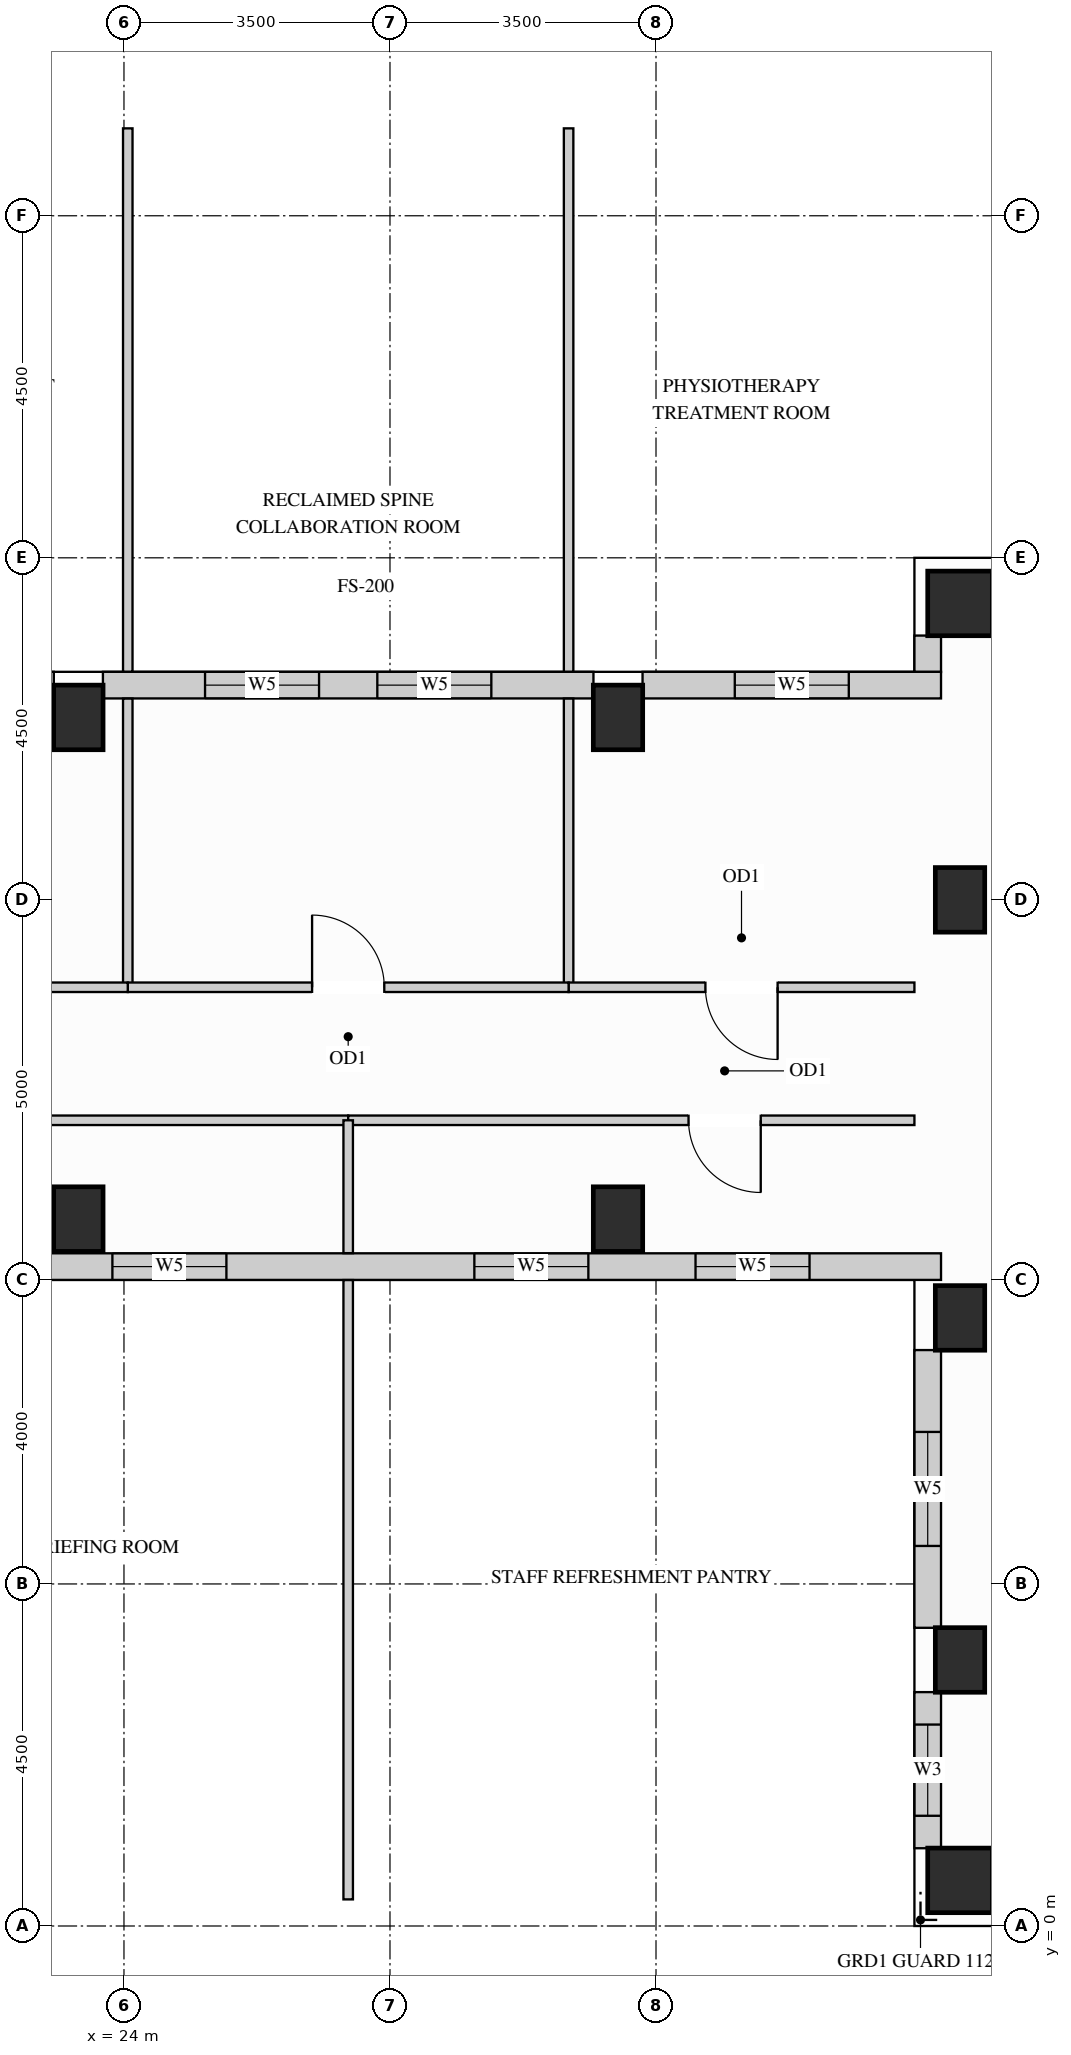
"""IFC4 building model, lengths in metres.
Left out: names, types, materials, properties, quantities, classifications, styles, units other than length and angle.
Written with IfcOpenShell. Run it as: python <this file> out.ifc"""

import sys

from ifc_helpers import new_model, si_unit, direction, frame, frame_2d, origin, origin_2d, place, context, subcontext, project, spatial, rectangle, extrude, source, transform, mapped, element, fill, save


model = new_model("IFC4")
c1 = context("Model", 3, precision=1e-05, world=origin(), true_north=direction((0.0, 1.0)))
c2 = subcontext(c1, "Body", "Model", "MODEL_VIEW")
j1 = project(units=[si_unit("LENGTHUNIT", "METRE"), si_unit("PLANEANGLEUNIT", "RADIAN")], contexts=[c1])
p1 = place(None, origin())
s1 = spatial("IfcSite", under=j1, at=p1, CompositionType="ELEMENT")
p2 = place(p1, origin())
s2 = spatial("IfcBuilding", under=s1, at=p2, CompositionType="ELEMENT")
p3 = place(p2, frame((0.0, 0.0, 226.8)))
s3 = spatial("IfcBuildingStorey", under=s2, at=p3, CompositionType="ELEMENT", Elevation=226.8)
m1 = source(origin(), c2, "Body", "SweptSolid", [
    extrude(rectangle(XDim=0.65, YDim=0.85, at=origin_2d()), origin(), (0.0, 0.0, 1.0), 3.4),
])
for number, where, z_axis, x_axis in (
    (1, (35.0, 13.5, 0.0), (0.0, 0.0, 1.0), (1.0, 0.0, 0.0)),
    (2, (35.0, 3.5, 0.0), (0.0, 0.0, 1.0), (1.0, 0.0, 0.0)),
    (3, (35.0, 8.0, 0.0), (0.0, 0.0, 1.0), (1.0, 0.0, 0.0)),
    (4, (23.4, 15.9, 0.0), (0.0, 0.0, 1.0), (1.0, 0.0, 0.0)),
    (5, (23.4, 9.3, 0.0), (0.0, 0.0, 1.0), (1.0, 0.0, 0.0)),
    (6, (30.5, 15.9, 0.0), (0.0, 0.0, 1.0), (1.0, 0.0, 0.0)),
    (7, (30.5, 9.3, 0.0), (0.0, 0.0, 1.0), (1.0, 0.0, 0.0)),
):
    element("IfcColumn", number, at=place(p3, frame(where, z_axis=z_axis, x_axis=x_axis)), inside=s3, PredefinedType="COLUMN", context=c2, shape_type="MappedRepresentation", body=[
        mapped(m1, transform((0.0, 0.0, 0.0), x_axis=(1.0, 0.0, 0.0), y_axis=(0.0, 1.0, 0.0), z_axis=(0.0, 0.0, 1.0))),
    ])
m2 = source(origin(), c2, "Body", "SweptSolid", [
    extrude(rectangle(XDim=0.85, YDim=0.85, at=origin_2d()), origin(), (0.0, 0.0, 1.0), 3.4),
])
for number, where, z_axis, x_axis in (
    (8, (35.0, 17.4, 0.0), (0.0, 0.0, 1.0), (1.0, 0.0, 0.0)),
    (9, (35.0, 0.6, 0.0), (0.0, 0.0, 1.0), (1.0, 0.0, 0.0)),
):
    element("IfcColumn", number, at=place(p3, frame(where, z_axis=z_axis, x_axis=x_axis)), inside=s3, PredefinedType="COLUMN", context=c2, shape_type="MappedRepresentation", body=[
        mapped(m2, transform((0.0, 0.0, 0.0), x_axis=(1.0, 0.0, 0.0), y_axis=(0.0, 1.0, 0.0), z_axis=(0.0, 0.0, 1.0))),
    ])
p4 = place(p3, frame((19.323, 8.675, 0.0), z_axis=(0.0, 0.0, 1.0), x_axis=(1.0, 0.0, 0.0)))
e10 = element("IfcWall", 10, at=p4, inside=s3, PredefinedType="SOLIDWALL", context=c2, shape_type="SweptSolid", body=[
    extrude(rectangle(XDim=15.427, YDim=0.35, at=frame_2d((7.713, 0.0))), origin(), (0.0, 0.0, 1.0), 3.385),
])
p5 = place(p4, frame((1.672, 0.0, 0.78)))
e11 = element("IfcOpeningElement", 11, at=p5, cuts=e10, PredefinedType="OPENING", context=c2, shape_type="SweptSolid", body=[
    extrude(rectangle(XDim=1.5, YDim=2.0, at=frame_2d((0.75, 1.0))), frame((0.0, 0.185, 0.0), z_axis=(0.0, -1.0, 0.0), x_axis=(1.0, 0.0, 0.0)), (0.0, 0.0, 1.0), 0.37),
])
p6 = place(p4, frame((4.525, 0.0, 0.78)))
e12 = element("IfcOpeningElement", 12, at=p6, cuts=e10, PredefinedType="OPENING", context=c2, shape_type="SweptSolid", body=[
    extrude(rectangle(XDim=1.5, YDim=2.0, at=frame_2d((0.75, 1.0))), frame((0.0, 0.185, 0.0), z_axis=(0.0, -1.0, 0.0), x_axis=(1.0, 0.0, 0.0)), (0.0, 0.0, 1.0), 0.37),
])
p7 = place(p4, frame((9.287, 0.0, 0.78)))
e13 = element("IfcOpeningElement", 13, at=p7, cuts=e10, PredefinedType="OPENING", context=c2, shape_type="SweptSolid", body=[
    extrude(rectangle(XDim=1.5, YDim=2.0, at=frame_2d((0.75, 1.0))), frame((0.0, 0.185, 0.0), z_axis=(0.0, -1.0, 0.0), x_axis=(1.0, 0.0, 0.0)), (0.0, 0.0, 1.0), 0.37),
])
p8 = place(p4, frame((12.197, 0.0, 0.78)))
e14 = element("IfcOpeningElement", 14, at=p8, cuts=e10, PredefinedType="OPENING", context=c2, shape_type="SweptSolid", body=[
    extrude(rectangle(XDim=1.5, YDim=2.0, at=frame_2d((0.75, 1.0))), frame((0.0, 0.185, 0.0), z_axis=(0.0, -1.0, 0.0), x_axis=(1.0, 0.0, 0.0)), (0.0, 0.0, 1.0), 0.37),
])
p9 = place(p3, frame((34.575, 7.577, 0.0), z_axis=(0.0, 0.0, 1.0), x_axis=(0.0, -1.0, 0.0)))
e15 = element("IfcWall", 15, at=p9, inside=s3, PredefinedType="SOLIDWALL", context=c2, shape_type="SweptSolid", body=[
    extrude(rectangle(XDim=3.654, YDim=0.35, at=frame_2d((1.827, 0.0))), origin(), (0.0, 0.0, 1.0), 3.385),
])
p10 = place(p9, frame((1.077, 0.0, 0.78)))
e16 = element("IfcOpeningElement", 16, at=p10, cuts=e15, PredefinedType="OPENING", context=c2, shape_type="SweptSolid", body=[
    extrude(rectangle(XDim=1.5, YDim=2.0, at=frame_2d((0.75, 1.0))), frame((0.0, 0.185, 0.0), z_axis=(0.0, -1.0, 0.0), x_axis=(1.0, 0.0, 0.0)), (0.0, 0.0, 1.0), 0.37),
])
p11 = place(p3, frame((34.575, 3.077, 0.0), z_axis=(0.0, 0.0, 1.0), x_axis=(0.0, -1.0, 0.0)))
e17 = element("IfcWall", 17, at=p11, inside=s3, PredefinedType="SOLIDWALL", context=c2, shape_type="SweptSolid", body=[
    extrude(rectangle(XDim=2.054, YDim=0.35, at=frame_2d((1.027, 0.0))), origin(), (0.0, 0.0, 1.0), 3.385),
])
p12 = place(p11, frame((0.427, 0.0, 0.78)))
e18 = element("IfcOpeningElement", 18, at=p12, cuts=e17, PredefinedType="OPENING", context=c2, shape_type="SweptSolid", body=[
    extrude(rectangle(XDim=1.2, YDim=2.0, at=frame_2d((0.6, 1.0))), frame((0.0, 0.185, 0.0), z_axis=(0.0, -1.0, 0.0), x_axis=(1.0, 0.0, 0.0)), (0.0, 0.0, 1.0), 0.37),
])
m3 = source(origin(), c2, "Body", "SweptSolid", [
    extrude(rectangle(XDim=0.479, YDim=0.35, at=frame_2d((0.24, 0.0))), origin(), (0.0, 0.0, 1.0), 3.385),
])
p13 = place(p3, frame((34.575, 16.977, 0.0), z_axis=(0.0, 0.0, 1.0), x_axis=(0.0, -1.0, 0.0)))
e19 = element("IfcWall", 19, at=p13, inside=s3, PredefinedType="SOLIDWALL", context=c2, shape_type="MappedRepresentation", body=[
    mapped(m3, transform((0.0, 0.0, 0.0), x_axis=(1.0, 0.0, 0.0), y_axis=(0.0, 1.0, 0.0), z_axis=(0.0, 0.0, 1.0))),
])
p14 = place(p3, frame((34.75, 16.325, 0.0), z_axis=(0.0, 0.0, 1.0), x_axis=(-1.0, 0.0, 0.0)))
e20 = element("IfcWall", 20, at=p14, inside=s3, PredefinedType="SOLIDWALL", context=c2, shape_type="SweptSolid", body=[
    extrude(rectangle(XDim=3.927, YDim=0.35, at=frame_2d((1.963, 0.0))), origin(), (0.0, 0.0, 1.0), 3.385),
])
p15 = place(p14, frame((1.213, 0.0, 0.78)))
e21 = element("IfcOpeningElement", 21, at=p15, cuts=e20, PredefinedType="OPENING", context=c2, shape_type="SweptSolid", body=[
    extrude(rectangle(XDim=1.5, YDim=2.0, at=frame_2d((0.75, 1.0))), frame((0.0, 0.185, 0.0), z_axis=(0.0, -1.0, 0.0), x_axis=(1.0, 0.0, 0.0)), (0.0, 0.0, 1.0), 0.37),
])
p16 = place(p3, frame((30.177, 16.325, 0.0), z_axis=(0.0, 0.0, 1.0), x_axis=(-1.0, 0.0, 0.0)))
e22 = element("IfcWall", 22, at=p16, inside=s3, PredefinedType="SOLIDWALL", context=c2, shape_type="SweptSolid", body=[
    extrude(rectangle(XDim=6.454, YDim=0.35, at=frame_2d((3.227, 0.0))), origin(), (0.0, 0.0, 1.0), 3.385),
])
p17 = place(p16, frame((1.344, 0.0, 0.78)))
e23 = element("IfcOpeningElement", 23, at=p17, cuts=e22, PredefinedType="OPENING", context=c2, shape_type="SweptSolid", body=[
    extrude(rectangle(XDim=1.5, YDim=2.0, at=frame_2d((0.75, 1.0))), frame((0.0, 0.185, 0.0), z_axis=(0.0, -1.0, 0.0), x_axis=(1.0, 0.0, 0.0)), (0.0, 0.0, 1.0), 0.37),
])
p18 = place(p16, frame((3.61, 0.0, 0.78)))
e24 = element("IfcOpeningElement", 24, at=p18, cuts=e22, PredefinedType="OPENING", context=c2, shape_type="SweptSolid", body=[
    extrude(rectangle(XDim=1.5, YDim=2.0, at=frame_2d((0.75, 1.0))), frame((0.0, 0.185, 0.0), z_axis=(0.0, -1.0, 0.0), x_axis=(1.0, 0.0, 0.0)), (0.0, 0.0, 1.0), 0.37),
])
p19 = place(p3, frame((23.077, 16.325, 0.0), z_axis=(0.0, 0.0, 1.0), x_axis=(-1.0, 0.0, 0.0)))
e25 = element("IfcWall", 25, at=p19, inside=s3, PredefinedType="SOLIDWALL", context=c2, shape_type="SweptSolid", body=[
    extrude(rectangle(XDim=3.927, YDim=0.35, at=frame_2d((1.963, 0.0))), origin(), (0.0, 0.0, 1.0), 3.385),
])
p20 = place(p19, frame((1.213, 0.0, 0.78)))
e26 = element("IfcOpeningElement", 26, at=p20, cuts=e25, PredefinedType="OPENING", context=c2, shape_type="SweptSolid", body=[
    extrude(rectangle(XDim=1.5, YDim=2.0, at=frame_2d((0.75, 1.0))), frame((0.0, 0.185, 0.0), z_axis=(0.0, -1.0, 0.0), x_axis=(1.0, 0.0, 0.0)), (0.0, 0.0, 1.0), 0.37),
])
m4 = source(origin(), c2, "Body", "SweptSolid", [
    extrude(rectangle(XDim=3.798, YDim=0.125, at=frame_2d((1.899, 0.0))), origin(), (0.0, 0.0, 1.0), 3.385),
])
p21 = place(p3, frame((24.05, 12.35, 0.0), z_axis=(0.0, 0.0, 1.0), x_axis=(0.0, 1.0, 0.0)))
e27 = element("IfcWall", 27, at=p21, inside=s3, PredefinedType="PARTITIONING", context=c2, shape_type="MappedRepresentation", body=[
    mapped(m4, transform((0.0, 0.0, 0.0), x_axis=(1.0, 0.0, 0.0), y_axis=(0.0, 1.0, 0.0), z_axis=(0.0, 0.0, 1.0))),
])
m5 = source(origin(), c2, "Body", "SweptSolid", [
    extrude(rectangle(XDim=7.148, YDim=0.125, at=frame_2d((3.574, 0.0))), origin(), (0.0, 0.0, 1.0), 3.385),
])
p22 = place(p3, frame((24.05, 16.502, 0.0), z_axis=(0.0, 0.0, 1.0), x_axis=(0.0, 1.0, 0.0)))
e28 = element("IfcWall", 28, at=p22, inside=s3, PredefinedType="PARTITIONING", context=c2, shape_type="MappedRepresentation", body=[
    mapped(m5, transform((0.0, 0.0, 0.0), x_axis=(1.0, 0.0, 0.0), y_axis=(0.0, 1.0, 0.0), z_axis=(0.0, 0.0, 1.0))),
])
p23 = place(p3, frame((29.85, 12.35, 0.0), z_axis=(0.0, 0.0, 1.0), x_axis=(0.0, 1.0, 0.0)))
e29 = element("IfcWall", 29, at=p23, inside=s3, PredefinedType="PARTITIONING", context=c2, shape_type="MappedRepresentation", body=[
    mapped(m4, transform((0.0, 0.0, 0.0), x_axis=(1.0, 0.0, 0.0), y_axis=(0.0, 1.0, 0.0), z_axis=(0.0, 0.0, 1.0))),
])
p24 = place(p3, frame((29.85, 16.502, 0.0), z_axis=(0.0, 0.0, 1.0), x_axis=(0.0, 1.0, 0.0)))
e30 = element("IfcWall", 30, at=p24, inside=s3, PredefinedType="PARTITIONING", context=c2, shape_type="MappedRepresentation", body=[
    mapped(m5, transform((0.0, 0.0, 0.0), x_axis=(1.0, 0.0, 0.0), y_axis=(0.0, 1.0, 0.0), z_axis=(0.0, 0.0, 1.0))),
])
p25 = place(p3, frame((29.85, 12.35, 0.0), z_axis=(0.0, 0.0, 1.0), x_axis=(1.0, 0.0, 0.0)))
e31 = element("IfcWall", 31, at=p25, inside=s3, PredefinedType="PARTITIONING", context=c2, shape_type="SweptSolid", body=[
    extrude(rectangle(XDim=4.55, YDim=0.125, at=frame_2d((2.275, 0.0))), origin(), (0.0, 0.0, 1.0), 3.385),
])
p26 = place(p25, frame((1.8, 0.0, 0.0)))
e32 = element("IfcOpeningElement", 32, at=p26, cuts=e31, PredefinedType="OPENING", context=c2, shape_type="SweptSolid", body=[
    extrude(rectangle(XDim=0.95, YDim=2.15, at=frame_2d((0.475, 1.075))), frame((0.0, 0.073, 0.0), z_axis=(0.0, -1.0, 0.0), x_axis=(1.0, 0.0, 0.0)), (0.0, 0.0, 1.0), 0.145),
])
p27 = place(p3, frame((24.05, 12.35, 0.0), z_axis=(0.0, 0.0, 1.0), x_axis=(1.0, 0.0, 0.0)))
e33 = element("IfcWall", 33, at=p27, inside=s3, PredefinedType="PARTITIONING", context=c2, shape_type="SweptSolid", body=[
    extrude(rectangle(XDim=5.8, YDim=0.125, at=frame_2d((2.9, 0.0))), origin(), (0.0, 0.0, 1.0), 3.385),
])
p28 = place(p27, frame((2.425, 0.0, 0.0)))
e34 = element("IfcOpeningElement", 34, at=p28, cuts=e33, PredefinedType="OPENING", context=c2, shape_type="SweptSolid", body=[
    extrude(rectangle(XDim=0.95, YDim=2.15, at=frame_2d((0.475, 1.075))), frame((0.0, 0.073, 0.0), z_axis=(0.0, -1.0, 0.0), x_axis=(1.0, 0.0, 0.0)), (0.0, 0.0, 1.0), 0.145),
])
p29 = place(p3, frame((19.5, 12.35, 0.0), z_axis=(0.0, 0.0, 1.0), x_axis=(1.0, 0.0, 0.0)))
e35 = element("IfcWall", 35, at=p29, inside=s3, PredefinedType="PARTITIONING", context=c2, shape_type="SweptSolid", body=[
    extrude(rectangle(XDim=4.55, YDim=0.125, at=frame_2d((2.275, 0.0))), origin(), (0.0, 0.0, 1.0), 3.385),
])
p30 = place(p29, frame((1.8, 0.0, 0.0)))
e36 = element("IfcOpeningElement", 36, at=p30, cuts=e35, PredefinedType="OPENING", context=c2, shape_type="SweptSolid", body=[
    extrude(rectangle(XDim=0.95, YDim=2.15, at=frame_2d((0.475, 1.075))), frame((0.0, 0.073, 0.0), z_axis=(0.0, -1.0, 0.0), x_axis=(1.0, 0.0, 0.0)), (0.0, 0.0, 1.0), 0.145),
])
p31 = place(p3, frame((19.5, 10.6, 0.0), z_axis=(0.0, 0.0, 1.0), x_axis=(1.0, 0.0, 0.0)))
e37 = element("IfcWall", 37, at=p31, inside=s3, PredefinedType="PARTITIONING", context=c2, shape_type="SweptSolid", body=[
    extrude(rectangle(XDim=7.45, YDim=0.125, at=frame_2d((3.725, 0.0))), origin(), (0.0, 0.0, 1.0), 3.385),
])
p32 = place(p31, frame((2.022, 0.0, 0.0)))
e38 = element("IfcOpeningElement", 38, at=p32, cuts=e37, PredefinedType="OPENING", context=c2, shape_type="SweptSolid", body=[
    extrude(rectangle(XDim=0.95, YDim=2.15, at=frame_2d((0.475, 1.075))), frame((0.0, 0.073, 0.0), z_axis=(0.0, -1.0, 0.0), x_axis=(1.0, 0.0, 0.0)), (0.0, 0.0, 1.0), 0.145),
])
p33 = place(p3, frame((26.95, 10.6, 0.0), z_axis=(0.0, 0.0, 1.0), x_axis=(1.0, 0.0, 0.0)))
e39 = element("IfcWall", 39, at=p33, inside=s3, PredefinedType="PARTITIONING", context=c2, shape_type="SweptSolid", body=[
    extrude(rectangle(XDim=7.45, YDim=0.125, at=frame_2d((3.725, 0.0))), origin(), (0.0, 0.0, 1.0), 3.385),
])
p34 = place(p33, frame((4.478, 0.0, 0.0)))
e40 = element("IfcOpeningElement", 40, at=p34, cuts=e39, PredefinedType="OPENING", context=c2, shape_type="SweptSolid", body=[
    extrude(rectangle(XDim=0.95, YDim=2.15, at=frame_2d((0.475, 1.075))), frame((0.0, 0.073, 0.0), z_axis=(0.0, -1.0, 0.0), x_axis=(1.0, 0.0, 0.0)), (0.0, 0.0, 1.0), 0.145),
])
m6 = source(origin(), c2, "Body", "SweptSolid", [
    extrude(rectangle(XDim=8.148, YDim=0.125, at=frame_2d((4.074, 0.0))), origin(), (0.0, 0.0, 1.0), 3.385),
])
p35 = place(p3, frame((26.95, 0.35, 0.0), z_axis=(0.0, 0.0, 1.0), x_axis=(0.0, 1.0, 0.0)))
e41 = element("IfcWall", 41, at=p35, inside=s3, PredefinedType="PARTITIONING", context=c2, shape_type="MappedRepresentation", body=[
    mapped(m6, transform((0.0, 0.0, 0.0), x_axis=(1.0, 0.0, 0.0), y_axis=(0.0, 1.0, 0.0), z_axis=(0.0, 0.0, 1.0))),
])
m7 = source(origin(), c2, "Body", "SweptSolid", [
    extrude(rectangle(XDim=1.748, YDim=0.125, at=frame_2d((0.874, 0.0))), origin(), (0.0, 0.0, 1.0), 3.385),
])
p36 = place(p3, frame((26.95, 8.852, 0.0), z_axis=(0.0, 0.0, 1.0), x_axis=(0.0, 1.0, 0.0)))
e42 = element("IfcWall", 42, at=p36, inside=s3, PredefinedType="PARTITIONING", context=c2, shape_type="MappedRepresentation", body=[
    mapped(m7, transform((0.0, 0.0, 0.0), x_axis=(1.0, 0.0, 0.0), y_axis=(0.0, 1.0, 0.0), z_axis=(0.0, 0.0, 1.0))),
])
m8 = source(origin(), c2, "Body", "SweptSolid", [
    extrude(rectangle(XDim=0.95, YDim=2.15, at=frame_2d((0.475, 1.075))), frame((0.0, 0.025, 0.0), z_axis=(0.0, -1.0, 0.0), x_axis=(1.0, 0.0, 0.0)), (0.0, 0.0, 1.0), 0.05),
])
p37 = place(p28, origin())
e43 = element("IfcDoor", 43, at=p37, inside=s3, OperationType="SINGLE_SWING_LEFT", PredefinedType="DOOR", context=c2, shape_type="MappedRepresentation", body=[
    mapped(m8, transform((0.0, 0.0, 0.0), x_axis=(1.0, 0.0, 0.0), y_axis=(0.0, 1.0, 0.0), z_axis=(0.0, 0.0, 1.0))),
])
fill(e34, e43)
p38 = place(p26, origin())
e44 = element("IfcDoor", 44, at=p38, inside=s3, OperationType="SINGLE_SWING_RIGHT", PredefinedType="DOOR", context=c2, shape_type="MappedRepresentation", body=[
    mapped(m8, transform((0.0, 0.0, 0.0), x_axis=(1.0, 0.0, 0.0), y_axis=(0.0, 1.0, 0.0), z_axis=(0.0, 0.0, 1.0))),
])
fill(e32, e44)
p39 = place(p34, origin())
e45 = element("IfcDoor", 45, at=p39, inside=s3, OperationType="SINGLE_SWING_RIGHT", PredefinedType="DOOR", context=c2, shape_type="MappedRepresentation", body=[
    mapped(m8, transform((0.0, 0.0, 0.0), x_axis=(1.0, 0.0, 0.0), y_axis=(0.0, 1.0, 0.0), z_axis=(0.0, 0.0, 1.0))),
])
fill(e40, e45)
m9 = source(origin(), c2, "Body", "SweptSolid", [
    extrude(rectangle(XDim=1.2, YDim=2.0, at=frame_2d((0.6, 1.0))), frame((0.0, 0.03, 0.0), z_axis=(0.0, -1.0, 0.0), x_axis=(1.0, 0.0, 0.0)), (0.0, 0.0, 1.0), 0.06),
])
p40 = place(p12, origin())
e46 = element("IfcWindow", 46, at=p40, inside=s3, PartitioningType="SINGLE_PANEL", PredefinedType="WINDOW", context=c2, shape_type="MappedRepresentation", body=[
    mapped(m9, transform((0.0, 0.0, 0.0), x_axis=(1.0, 0.0, 0.0), y_axis=(0.0, 1.0, 0.0), z_axis=(0.0, 0.0, 1.0))),
])
fill(e18, e46)
m10 = source(origin(), c2, "Body", "SweptSolid", [
    extrude(rectangle(XDim=1.5, YDim=2.0, at=frame_2d((0.75, 1.0))), frame((0.0, 0.03, 0.0), z_axis=(0.0, -1.0, 0.0), x_axis=(1.0, 0.0, 0.0)), (0.0, 0.0, 1.0), 0.06),
])
p41 = place(p6, origin())
e47 = element("IfcWindow", 47, at=p41, inside=s3, PartitioningType="SINGLE_PANEL", PredefinedType="WINDOW", context=c2, shape_type="MappedRepresentation", body=[
    mapped(m10, transform((0.0, 0.0, 0.0), x_axis=(1.0, 0.0, 0.0), y_axis=(0.0, 1.0, 0.0), z_axis=(0.0, 0.0, 1.0))),
])
fill(e12, e47)
p42 = place(p7, origin())
e48 = element("IfcWindow", 48, at=p42, inside=s3, PartitioningType="SINGLE_PANEL", PredefinedType="WINDOW", context=c2, shape_type="MappedRepresentation", body=[
    mapped(m10, transform((0.0, 0.0, 0.0), x_axis=(1.0, 0.0, 0.0), y_axis=(0.0, 1.0, 0.0), z_axis=(0.0, 0.0, 1.0))),
])
fill(e13, e48)
p43 = place(p8, origin())
e49 = element("IfcWindow", 49, at=p43, inside=s3, PartitioningType="SINGLE_PANEL", PredefinedType="WINDOW", context=c2, shape_type="MappedRepresentation", body=[
    mapped(m10, transform((0.0, 0.0, 0.0), x_axis=(1.0, 0.0, 0.0), y_axis=(0.0, 1.0, 0.0), z_axis=(0.0, 0.0, 1.0))),
])
fill(e14, e49)
p44 = place(p10, origin())
e50 = element("IfcWindow", 50, at=p44, inside=s3, PartitioningType="SINGLE_PANEL", PredefinedType="WINDOW", context=c2, shape_type="MappedRepresentation", body=[
    mapped(m10, transform((0.0, 0.0, 0.0), x_axis=(1.0, 0.0, 0.0), y_axis=(0.0, 1.0, 0.0), z_axis=(0.0, 0.0, 1.0))),
])
fill(e16, e50)
p45 = place(p15, origin())
e51 = element("IfcWindow", 51, at=p45, inside=s3, PartitioningType="SINGLE_PANEL", PredefinedType="WINDOW", context=c2, shape_type="MappedRepresentation", body=[
    mapped(m10, transform((0.0, 0.0, 0.0), x_axis=(1.0, 0.0, 0.0), y_axis=(0.0, 1.0, 0.0), z_axis=(0.0, 0.0, 1.0))),
])
fill(e21, e51)
p46 = place(p17, origin())
e52 = element("IfcWindow", 52, at=p46, inside=s3, PartitioningType="SINGLE_PANEL", PredefinedType="WINDOW", context=c2, shape_type="MappedRepresentation", body=[
    mapped(m10, transform((0.0, 0.0, 0.0), x_axis=(1.0, 0.0, 0.0), y_axis=(0.0, 1.0, 0.0), z_axis=(0.0, 0.0, 1.0))),
])
fill(e23, e52)
p47 = place(p18, origin())
e53 = element("IfcWindow", 53, at=p47, inside=s3, PartitioningType="SINGLE_PANEL", PredefinedType="WINDOW", context=c2, shape_type="MappedRepresentation", body=[
    mapped(m10, transform((0.0, 0.0, 0.0), x_axis=(1.0, 0.0, 0.0), y_axis=(0.0, 1.0, 0.0), z_axis=(0.0, 0.0, 1.0))),
])
fill(e24, e53)
save(model, sys.argv[1])
